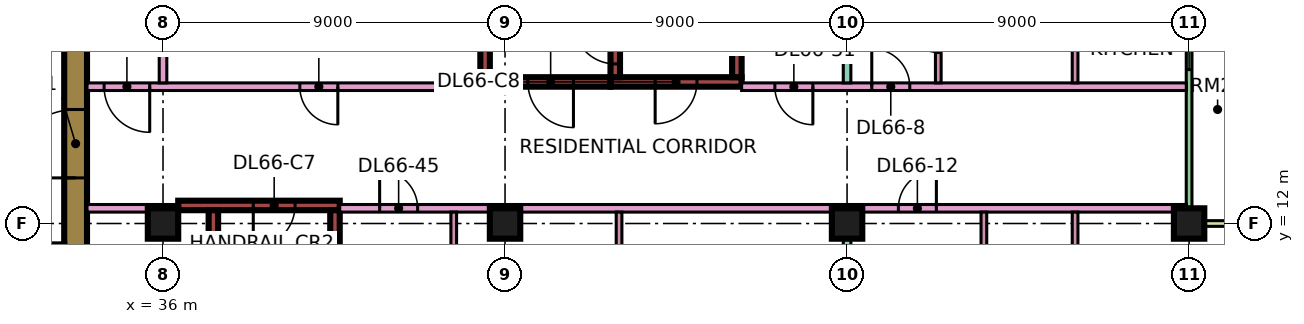
"""IFC4 building model, lengths in metres.
Left out: names, types, materials, properties, quantities, classifications, styles, units other than length and angle.
Written with IfcOpenShell. Run it as: python <this file> out.ifc"""

import sys

from ifc_helpers import new_model, si_unit, direction, frame, frame_2d, origin, origin_2d, place, context, subcontext, project, spatial, rectangle, extrude, element, fill, save


model = new_model("IFC4")
c1 = context("Model", 3, precision=1e-05, world=origin(), true_north=direction((0.0, 1.0)))
c2 = subcontext(c1, "Body", "Model", "MODEL_VIEW")
j1 = project(units=[si_unit("LENGTHUNIT", "METRE"), si_unit("PLANEANGLEUNIT", "RADIAN")], contexts=[c1])
p1 = place(None, origin())
s1 = spatial("IfcSite", under=j1, at=p1, CompositionType="ELEMENT")
p2 = place(p1, origin())
s2 = spatial("IfcBuilding", under=s1, at=p2, CompositionType="ELEMENT")
p3 = place(p2, frame((0.0, 0.0, 284.65)))
s3 = spatial("IfcBuildingStorey", under=s2, at=p3, CompositionType="ELEMENT", Elevation=284.65)
for number, where, z_axis, x_axis in (
    (1, (36.0, 12.0, 0.0), (0.0, 0.0, 1.0), (1.0, 0.0, 0.0)),
    (2, (45.0, 12.0, 0.0), (0.0, 0.0, 1.0), (1.0, 0.0, 0.0)),
    (3, (54.0, 12.0, 0.0), (0.0, 0.0, 1.0), (1.0, 0.0, 0.0)),
    (4, (63.0, 12.0, 0.0), (0.0, 0.0, 1.0), (1.0, 0.0, 0.0)),
):
    element("IfcColumn", number, at=place(p3, frame(where, z_axis=z_axis, x_axis=x_axis)), inside=s3, PredefinedType="COLUMN", context=c2, shape_type="SweptSolid", body=[
        extrude(rectangle(XDim=0.8, YDim=0.8, at=origin_2d()), origin(), (0.0, 0.0, 1.0), 3.75),
    ])
p4 = place(p3, frame((33.7, 7.6, 0.0), z_axis=(0.0, 0.0, 1.0), x_axis=(0.0, 1.0, 0.0)))
e5 = element("IfcWall", 5, at=p4, inside=s3, PredefinedType="SHEAR", context=c2, shape_type="SweptSolid", body=[
    extrude(rectangle(XDim=11.8, YDim=0.6, at=frame_2d((5.9, 0.0))), origin(), (0.0, 0.0, 1.0), 3.75),
])
p5 = place(p4, frame((5.6, 0.0, 0.0)))
e6 = element("IfcOpeningElement", 6, at=p5, cuts=e5, PredefinedType="OPENING", context=c2, shape_type="SweptSolid", body=[
    extrude(rectangle(XDim=1.8, YDim=2.4, at=frame_2d((0.9, 1.2))), frame((0.0, 0.31, 0.0), z_axis=(0.0, -1.0, 0.0), x_axis=(1.0, 0.0, 0.0)), (0.0, 0.0, 1.0), 0.62),
])
p6 = place(p3, frame((36.4, 12.475, 0.0), z_axis=(0.0, 0.0, 1.0), x_axis=(1.0, 0.0, 0.0)))
e7 = element("IfcWall", 7, at=p6, inside=s3, PredefinedType="SHEAR", context=c2, shape_type="SweptSolid", body=[
    extrude(rectangle(XDim=4.25, YDim=0.25, at=frame_2d((2.125, 0.0))), origin(), (0.0, 0.0, 1.0), 3.75),
])
p7 = place(p6, frame((1.975, 0.0, 0.0)))
e8 = element("IfcOpeningElement", 8, at=p7, cuts=e7, PredefinedType="OPENING", context=c2, shape_type="SweptSolid", body=[
    extrude(rectangle(XDim=1.1, YDim=2.2, at=frame_2d((0.55, 1.1))), frame((0.0, 0.135, 0.0), z_axis=(0.0, -1.0, 0.0), x_axis=(1.0, 0.0, 0.0)), (0.0, 0.0, 1.0), 0.27),
])
for number, where, z_axis, x_axis in (
    (9, (37.325, 5.85, 0.0), (0.0, 0.0, 1.0), (0.0, 1.0, 0.0)),
    (10, (40.525, 5.85, 0.0), (0.0, 0.0, 1.0), (0.0, 1.0, 0.0)),
):
    element("IfcWall", number, at=place(p3, frame(where, z_axis=z_axis, x_axis=x_axis)), inside=s3, PredefinedType="SHEAR", context=c2, shape_type="SweptSolid", body=[
        extrude(rectangle(XDim=6.5, YDim=0.25, at=frame_2d((3.25, 0.0))), origin(), (0.0, 0.0, 1.0), 3.75),
    ])
p8 = place(p3, frame((47.775, 15.725, 0.0), z_axis=(0.0, 0.0, 1.0), x_axis=(1.0, 0.0, 0.0)))
e11 = element("IfcWall", 11, at=p8, inside=s3, PredefinedType="SHEAR", context=c2, shape_type="SweptSolid", body=[
    extrude(rectangle(XDim=3.45, YDim=0.25, at=frame_2d((1.725, 0.0))), origin(), (0.0, 0.0, 1.0), 3.75),
])
p9 = place(p8, frame((1.175, 0.0, 0.0)))
e12 = element("IfcOpeningElement", 12, at=p9, cuts=e11, PredefinedType="OPENING", context=c2, shape_type="SweptSolid", body=[
    extrude(rectangle(XDim=1.1, YDim=2.2, at=frame_2d((0.55, 1.1))), frame((0.0, 0.135, 0.0), z_axis=(0.0, -1.0, 0.0), x_axis=(1.0, 0.0, 0.0)), (0.0, 0.0, 1.0), 0.27),
])
p10 = place(p3, frame((47.9, 15.85, 0.0), z_axis=(0.0, 0.0, 1.0), x_axis=(0.0, 1.0, 0.0)))
e13 = element("IfcWall", 13, at=p10, inside=s3, PredefinedType="SHEAR", context=c2, shape_type="SweptSolid", body=[
    extrude(rectangle(XDim=6.5, YDim=0.25, at=frame_2d((3.25, 0.0))), origin(), (0.0, 0.0, 1.0), 3.75),
])
p11 = place(p10, frame((0.35, 0.0, 0.0)))
e14 = element("IfcOpeningElement", 14, at=p11, cuts=e13, PredefinedType="OPENING", context=c2, shape_type="SweptSolid", body=[
    extrude(rectangle(XDim=1.1, YDim=2.2, at=frame_2d((0.55, 1.1))), frame((0.0, 0.135, 0.0), z_axis=(0.0, -1.0, 0.0), x_axis=(1.0, 0.0, 0.0)), (0.0, 0.0, 1.0), 0.27),
])
p12 = place(p3, frame((51.1, 15.85, 0.0), z_axis=(0.0, 0.0, 1.0), x_axis=(0.0, 1.0, 0.0)))
e15 = element("IfcWall", 15, at=p12, inside=s3, PredefinedType="SHEAR", context=c2, shape_type="SweptSolid", body=[
    extrude(rectangle(XDim=6.5, YDim=0.25, at=frame_2d((3.25, 0.0))), origin(), (0.0, 0.0, 1.0), 3.75),
])
p13 = place(p3, frame((44.35, 15.725, 0.0), z_axis=(0.0, 0.0, 1.0), x_axis=(1.0, 0.0, 0.0)))
e16 = element("IfcWall", 16, at=p13, inside=s3, PredefinedType="SHEAR", context=c2, shape_type="SweptSolid", body=[
    extrude(rectangle(XDim=3.425, YDim=0.25, at=frame_2d((1.712, 0.0))), origin(), (0.0, 0.0, 1.0), 3.75),
])
p14 = place(p13, frame((1.25, 0.0, 0.0)))
e17 = element("IfcOpeningElement", 17, at=p14, cuts=e16, PredefinedType="OPENING", context=c2, shape_type="SweptSolid", body=[
    extrude(rectangle(XDim=1.2, YDim=2.2, at=frame_2d((0.6, 1.1))), frame((0.0, 0.135, 0.0), z_axis=(0.0, -1.0, 0.0), x_axis=(1.0, 0.0, 0.0)), (0.0, 0.0, 1.0), 0.27),
])
p15 = place(p3, frame((44.475, 15.85, 0.0), z_axis=(0.0, 0.0, 1.0), x_axis=(0.0, 1.0, 0.0)))
e18 = element("IfcWall", 18, at=p15, inside=s3, PredefinedType="SHEAR", context=c2, shape_type="SweptSolid", body=[
    extrude(rectangle(XDim=6.5, YDim=0.25, at=frame_2d((3.25, 0.0))), origin(), (0.0, 0.0, 1.0), 3.75),
])
p16 = place(p15, frame((1.75, 0.0, 0.0)))
e19 = element("IfcOpeningElement", 19, at=p16, cuts=e18, PredefinedType="OPENING", context=c2, shape_type="SweptSolid", body=[
    extrude(rectangle(XDim=1.1, YDim=2.2, at=frame_2d((0.55, 1.1))), frame((0.0, 0.135, 0.0), z_axis=(0.0, -1.0, 0.0), x_axis=(1.0, 0.0, 0.0)), (0.0, 0.0, 1.0), 0.27),
])
p17 = place(p15, frame((4.3, 0.0, 0.0)))
e20 = element("IfcOpeningElement", 20, at=p17, cuts=e18, PredefinedType="OPENING", context=c2, shape_type="SweptSolid", body=[
    extrude(rectangle(XDim=1.1, YDim=2.2, at=frame_2d((0.55, 1.1))), frame((0.0, 0.135, 0.0), z_axis=(0.0, -1.0, 0.0), x_axis=(1.0, 0.0, 0.0)), (0.0, 0.0, 1.0), 0.27),
])
p18 = place(p3, frame((63.0, 12.075, 0.0), z_axis=(0.0, 0.0, 1.0), x_axis=(0.0, 1.0, 0.0)))
e21 = element("IfcWall", 21, at=p18, inside=s3, PredefinedType="SOLIDWALL", context=c2, shape_type="SweptSolid", body=[
    extrude(rectangle(XDim=10.35, YDim=0.15, at=frame_2d((5.175, 0.0))), origin(), (0.0, 0.0, 1.0), 3.35),
])
p19 = place(p18, frame((3.975, 0.0, 0.45)))
e22 = element("IfcOpeningElement", 22, at=p19, cuts=e21, PredefinedType="OPENING", context=c2, shape_type="SweptSolid", body=[
    extrude(rectangle(XDim=1.8, YDim=2.4, at=frame_2d((0.9, 1.2))), frame((0.0, 0.085, 0.0), z_axis=(0.0, -1.0, 0.0), x_axis=(1.0, 0.0, 0.0)), (0.0, 0.0, 1.0), 0.17),
])
p20 = place(p18, frame((7.988, 0.0, 0.45)))
e23 = element("IfcOpeningElement", 23, at=p20, cuts=e21, PredefinedType="OPENING", context=c2, shape_type="SweptSolid", body=[
    extrude(rectangle(XDim=1.8, YDim=2.4, at=frame_2d((0.9, 1.2))), frame((0.0, 0.085, 0.0), z_axis=(0.0, -1.0, 0.0), x_axis=(1.0, 0.0, 0.0)), (0.0, 0.0, 1.0), 0.17),
])
p21 = place(p3, frame((64.5, 12.0, 0.0), z_axis=(0.0, 0.0, 1.0), x_axis=(-1.0, 0.0, 0.0)))
e24 = element("IfcWall", 24, at=p21, inside=s3, PredefinedType="SOLIDWALL", context=c2, shape_type="SweptSolid", body=[
    extrude(rectangle(XDim=1.5, YDim=0.15, at=frame_2d((0.75, 0.0))), origin(), (0.0, 0.0, 1.0), 3.35),
])
p22 = place(p3, frame((34.0, 12.4, 0.0), z_axis=(0.0, 0.0, 1.0), x_axis=(1.0, 0.0, 0.0)))
e25 = element("IfcWall", 25, at=p22, inside=s3, PredefinedType="PARTITIONING", context=c2, shape_type="SweptSolid", body=[
    extrude(rectangle(XDim=2.401, YDim=0.2, at=frame_2d((1.2, 0.0))), origin(), (0.0, 0.0, 1.0), 3.35),
])
p23 = place(p3, frame((34.0, 15.6, 0.0), z_axis=(0.0, 0.0, 1.0), x_axis=(1.0, 0.0, 0.0)))
e26 = element("IfcWall", 26, at=p23, inside=s3, PredefinedType="PARTITIONING", context=c2, shape_type="SweptSolid", body=[
    extrude(rectangle(XDim=10.35, YDim=0.2, at=frame_2d((5.175, 0.0))), origin(), (0.0, 0.0, 1.0), 3.35),
])
p24 = place(p23, frame((5.6, 0.0, 0.0)))
e27 = element("IfcOpeningElement", 27, at=p24, cuts=e26, PredefinedType="OPENING", context=c2, shape_type="SweptSolid", body=[
    extrude(rectangle(XDim=1.0, YDim=2.1, at=frame_2d((0.5, 1.05))), frame((0.0, 0.11, 0.0), z_axis=(0.0, -1.0, 0.0), x_axis=(1.0, 0.0, 0.0)), (0.0, 0.0, 1.0), 0.22),
])
p25 = place(p23, frame((0.45, 0.0, 0.0)))
e28 = element("IfcOpeningElement", 28, at=p25, cuts=e26, PredefinedType="OPENING", context=c2, shape_type="SweptSolid", body=[
    extrude(rectangle(XDim=1.2, YDim=2.1, at=frame_2d((0.6, 1.05))), frame((0.0, 0.11, 0.0), z_axis=(0.0, -1.0, 0.0), x_axis=(1.0, 0.0, 0.0)), (0.0, 0.0, 1.0), 0.22),
])
p26 = place(p3, frame((36.0, 15.7, 0.0), z_axis=(0.0, 0.0, 1.0), x_axis=(0.0, 1.0, 0.0)))
e29 = element("IfcWall", 29, at=p26, inside=s3, PredefinedType="PARTITIONING", context=c2, shape_type="SweptSolid", body=[
    extrude(rectangle(XDim=8.3, YDim=0.2, at=frame_2d((4.15, 0.0))), origin(), (0.0, 0.0, 1.0), 3.35),
])
p27 = place(p3, frame((40.65, 12.4, 0.0), z_axis=(0.0, 0.0, 1.0), x_axis=(1.0, 0.0, 0.0)))
e30 = element("IfcWall", 30, at=p27, inside=s3, PredefinedType="PARTITIONING", context=c2, shape_type="SweptSolid", body=[
    extrude(rectangle(XDim=22.276, YDim=0.2, at=frame_2d((11.138, 0.0))), origin(), (0.0, 0.0, 1.0), 3.35),
])
p28 = place(p27, frame((14.7, 0.0, 0.0)))
e31 = element("IfcOpeningElement", 31, at=p28, cuts=e30, PredefinedType="OPENING", context=c2, shape_type="SweptSolid", body=[
    extrude(rectangle(XDim=1.0, YDim=2.1, at=frame_2d((0.5, 1.05))), frame((0.0, 0.11, 0.0), z_axis=(0.0, -1.0, 0.0), x_axis=(1.0, 0.0, 0.0)), (0.0, 0.0, 1.0), 0.22),
])
p29 = place(p27, frame((1.05, 0.0, 0.0)))
e32 = element("IfcOpeningElement", 32, at=p29, cuts=e30, PredefinedType="OPENING", context=c2, shape_type="SweptSolid", body=[
    extrude(rectangle(XDim=1.0, YDim=2.1, at=frame_2d((0.5, 1.05))), frame((0.0, 0.11, 0.0), z_axis=(0.0, -1.0, 0.0), x_axis=(1.0, 0.0, 0.0)), (0.0, 0.0, 1.0), 0.22),
])
p30 = place(p3, frame((43.65, 5.975, 0.0), z_axis=(0.0, 0.0, 1.0), x_axis=(0.0, 1.0, 0.0)))
e33 = element("IfcWall", 33, at=p30, inside=s3, PredefinedType="PARTITIONING", context=c2, shape_type="SweptSolid", body=[
    extrude(rectangle(XDim=6.325, YDim=0.15, at=frame_2d((3.163, 0.0))), origin(), (0.0, 0.0, 1.0), 3.35),
])
p31 = place(p30, frame((4.275, 0.0, 0.0)))
e34 = element("IfcOpeningElement", 34, at=p31, cuts=e33, PredefinedType="OPENING", context=c2, shape_type="SweptSolid", body=[
    extrude(rectangle(XDim=0.9, YDim=2.1, at=frame_2d((0.45, 1.05))), frame((0.0, 0.085, 0.0), z_axis=(0.0, -1.0, 0.0), x_axis=(1.0, 0.0, 0.0)), (0.0, 0.0, 1.0), 0.17),
])
p32 = place(p3, frame((48.0, 5.975, 0.0), z_axis=(0.0, 0.0, 1.0), x_axis=(0.0, 1.0, 0.0)))
e35 = element("IfcWall", 35, at=p32, inside=s3, PredefinedType="PARTITIONING", context=c2, shape_type="SweptSolid", body=[
    extrude(rectangle(XDim=6.325, YDim=0.15, at=frame_2d((3.163, 0.0))), origin(), (0.0, 0.0, 1.0), 3.35),
])
p33 = place(p3, frame((51.225, 15.6, 0.0), z_axis=(0.0, 0.0, 1.0), x_axis=(1.0, 0.0, 0.0)))
e36 = element("IfcWall", 36, at=p33, inside=s3, PredefinedType="PARTITIONING", context=c2, shape_type="SweptSolid", body=[
    extrude(rectangle(XDim=11.701, YDim=0.2, at=frame_2d((5.851, 0.0))), origin(), (0.0, 0.0, 1.0), 3.35),
])
p34 = place(p33, frame((3.425, 0.0, 0.0)))
e37 = element("IfcOpeningElement", 37, at=p34, cuts=e36, PredefinedType="OPENING", context=c2, shape_type="SweptSolid", body=[
    extrude(rectangle(XDim=1.0, YDim=2.1, at=frame_2d((0.5, 1.05))), frame((0.0, 0.11, 0.0), z_axis=(0.0, -1.0, 0.0), x_axis=(1.0, 0.0, 0.0)), (0.0, 0.0, 1.0), 0.22),
])
p35 = place(p33, frame((0.875, 0.0, 0.0)))
e38 = element("IfcOpeningElement", 38, at=p35, cuts=e36, PredefinedType="OPENING", context=c2, shape_type="SweptSolid", body=[
    extrude(rectangle(XDim=1.0, YDim=2.1, at=frame_2d((0.5, 1.05))), frame((0.0, 0.11, 0.0), z_axis=(0.0, -1.0, 0.0), x_axis=(1.0, 0.0, 0.0)), (0.0, 0.0, 1.0), 0.22),
])
p36 = place(p3, frame((54.0, 5.825, 0.0), z_axis=(0.0, 0.0, 1.0), x_axis=(0.0, 1.0, 0.0)))
e39 = element("IfcWall", 39, at=p36, inside=s3, PredefinedType="PARTITIONING", context=c2, shape_type="SweptSolid", body=[
    extrude(rectangle(XDim=6.475, YDim=0.2, at=frame_2d((3.238, 0.0))), origin(), (0.0, 0.0, 1.0), 3.35),
])
p37 = place(p3, frame((54.0, 15.7, 0.0), z_axis=(0.0, 0.0, 1.0), x_axis=(0.0, 1.0, 0.0)))
e40 = element("IfcWall", 40, at=p37, inside=s3, PredefinedType="PARTITIONING", context=c2, shape_type="SweptSolid", body=[
    extrude(rectangle(XDim=8.3, YDim=0.2, at=frame_2d((4.15, 0.0))), origin(), (0.0, 0.0, 1.0), 3.35),
])
p38 = place(p3, frame((56.4, 15.7, 0.0), z_axis=(0.0, 0.0, 1.0), x_axis=(0.0, 1.0, 0.0)))
e41 = element("IfcWall", 41, at=p38, inside=s3, PredefinedType="PARTITIONING", context=c2, shape_type="SweptSolid", body=[
    extrude(rectangle(XDim=2.525, YDim=0.15, at=frame_2d((1.263, 0.0))), origin(), (0.0, 0.0, 1.0), 3.35),
])
p39 = place(p38, frame((0.8, 0.0, 0.0)))
e42 = element("IfcOpeningElement", 42, at=p39, cuts=e41, PredefinedType="OPENING", context=c2, shape_type="SweptSolid", body=[
    extrude(rectangle(XDim=0.8, YDim=2.1, at=frame_2d((0.4, 1.05))), frame((0.0, 0.085, 0.0), z_axis=(0.0, -1.0, 0.0), x_axis=(1.0, 0.0, 0.0)), (0.0, 0.0, 1.0), 0.17),
])
p40 = place(p3, frame((57.6, 6.925, 0.0), z_axis=(0.0, 0.0, 1.0), x_axis=(0.0, 1.0, 0.0)))
e43 = element("IfcWall", 43, at=p40, inside=s3, PredefinedType="PARTITIONING", context=c2, shape_type="SweptSolid", body=[
    extrude(rectangle(XDim=5.375, YDim=0.15, at=frame_2d((2.688, 0.0))), origin(), (0.0, 0.0, 1.0), 3.35),
])
p41 = place(p3, frame((60.0, 7.075, 0.0), z_axis=(0.0, 0.0, 1.0), x_axis=(0.0, 1.0, 0.0)))
e44 = element("IfcWall", 44, at=p41, inside=s3, PredefinedType="PARTITIONING", context=c2, shape_type="SweptSolid", body=[
    extrude(rectangle(XDim=5.225, YDim=0.15, at=frame_2d((2.613, 0.0))), origin(), (0.0, 0.0, 1.0), 3.35),
])
p42 = place(p3, frame((60.0, 15.7, 0.0), z_axis=(0.0, 0.0, 1.0), x_axis=(0.0, 1.0, 0.0)))
e45 = element("IfcWall", 45, at=p42, inside=s3, PredefinedType="PARTITIONING", context=c2, shape_type="SweptSolid", body=[
    extrude(rectangle(XDim=2.525, YDim=0.15, at=frame_2d((1.263, 0.0))), origin(), (0.0, 0.0, 1.0), 3.35),
])
p43 = place(p19, origin())
e46 = element("IfcWindow", 46, at=p43, inside=s3, PartitioningType="SINGLE_PANEL", PredefinedType="WINDOW", context=c2, shape_type="SweptSolid", body=[
    extrude(rectangle(XDim=1.8, YDim=2.4, at=frame_2d((0.9, 1.2))), frame((0.0, 0.03, 0.0), z_axis=(0.0, -1.0, 0.0), x_axis=(1.0, 0.0, 0.0)), (0.0, 0.0, 1.0), 0.06),
])
fill(e22, e46)
p44 = place(p5, origin())
e47 = element("IfcDoor", 47, at=p44, inside=s3, OperationType="DOUBLE_DOOR_SINGLE_SWING", PredefinedType="DOOR", context=c2, shape_type="SweptSolid", body=[
    extrude(rectangle(XDim=1.8, YDim=2.4, at=frame_2d((0.9, 1.2))), frame((0.0, 0.025, 0.0), z_axis=(0.0, -1.0, 0.0), x_axis=(1.0, 0.0, 0.0)), (0.0, 0.0, 1.0), 0.05),
])
fill(e6, e47)
p45 = place(p7, frame((1.1, 0.0, 0.0), z_axis=(0.0, 0.0, 1.0), x_axis=(-1.0, 0.0, 0.0)))
e48 = element("IfcDoor", 48, at=p45, inside=s3, OperationType="SINGLE_SWING_LEFT", PredefinedType="DOOR", context=c2, shape_type="SweptSolid", body=[
    extrude(rectangle(XDim=1.1, YDim=2.2, at=frame_2d((0.55, 1.1))), frame((0.0, 0.025, 0.0), z_axis=(0.0, -1.0, 0.0), x_axis=(1.0, 0.0, 0.0)), (0.0, 0.0, 1.0), 0.05),
])
fill(e8, e48)
p46 = place(p9, frame((1.1, 0.0, 0.0), z_axis=(0.0, 0.0, 1.0), x_axis=(-1.0, 0.0, 0.0)))
e49 = element("IfcDoor", 49, at=p46, inside=s3, OperationType="SINGLE_SWING_LEFT", PredefinedType="DOOR", context=c2, shape_type="SweptSolid", body=[
    extrude(rectangle(XDim=1.1, YDim=2.2, at=frame_2d((0.55, 1.1))), frame((0.0, 0.025, 0.0), z_axis=(0.0, -1.0, 0.0), x_axis=(1.0, 0.0, 0.0)), (0.0, 0.0, 1.0), 0.05),
])
fill(e12, e49)
p47 = place(p14, origin())
e50 = element("IfcDoor", 50, at=p47, inside=s3, OperationType="SINGLE_SWING_RIGHT", PredefinedType="DOOR", context=c2, shape_type="SweptSolid", body=[
    extrude(rectangle(XDim=1.2, YDim=2.2, at=frame_2d((0.6, 1.1))), frame((0.0, 0.025, 0.0), z_axis=(0.0, -1.0, 0.0), x_axis=(1.0, 0.0, 0.0)), (0.0, 0.0, 1.0), 0.05),
])
fill(e17, e50)
p48 = place(p11, frame((1.1, 0.0, 0.0), z_axis=(0.0, 0.0, 1.0), x_axis=(-1.0, 0.0, 0.0)))
e51 = element("IfcDoor", 51, at=p48, inside=s3, OperationType="SINGLE_SWING_RIGHT", PredefinedType="DOOR", context=c2, shape_type="SweptSolid", body=[
    extrude(rectangle(XDim=1.1, YDim=2.2, at=frame_2d((0.55, 1.1))), frame((0.0, 0.025, 0.0), z_axis=(0.0, -1.0, 0.0), x_axis=(1.0, 0.0, 0.0)), (0.0, 0.0, 1.0), 0.05),
])
fill(e14, e51)
p49 = place(p24, origin())
e52 = element("IfcDoor", 52, at=p49, inside=s3, OperationType="SINGLE_SWING_RIGHT", PredefinedType="DOOR", context=c2, shape_type="SweptSolid", body=[
    extrude(rectangle(XDim=1.0, YDim=2.1, at=frame_2d((0.5, 1.05))), frame((0.0, 0.025, 0.0), z_axis=(0.0, -1.0, 0.0), x_axis=(1.0, 0.0, 0.0)), (0.0, 0.0, 1.0), 0.05),
])
fill(e27, e52)
p50 = place(p39, frame((0.8, 0.0, 0.0), z_axis=(0.0, 0.0, 1.0), x_axis=(-1.0, 0.0, 0.0)))
e53 = element("IfcDoor", 53, at=p50, inside=s3, OperationType="SINGLE_SWING_RIGHT", PredefinedType="DOOR", context=c2, shape_type="SweptSolid", body=[
    extrude(rectangle(XDim=0.8, YDim=2.1, at=frame_2d((0.4, 1.05))), frame((0.0, 0.025, 0.0), z_axis=(0.0, -1.0, 0.0), x_axis=(1.0, 0.0, 0.0)), (0.0, 0.0, 1.0), 0.05),
])
fill(e42, e53)
p51 = place(p34, origin())
e54 = element("IfcDoor", 54, at=p51, inside=s3, OperationType="SINGLE_SWING_LEFT", PredefinedType="DOOR", context=c2, shape_type="SweptSolid", body=[
    extrude(rectangle(XDim=1.0, YDim=2.1, at=frame_2d((0.5, 1.05))), frame((0.0, 0.025, 0.0), z_axis=(0.0, -1.0, 0.0), x_axis=(1.0, 0.0, 0.0)), (0.0, 0.0, 1.0), 0.05),
])
fill(e37, e54)
p52 = place(p28, frame((1.0, 0.0, 0.0), z_axis=(0.0, 0.0, 1.0), x_axis=(-1.0, 0.0, 0.0)))
e55 = element("IfcDoor", 55, at=p52, inside=s3, OperationType="SINGLE_SWING_RIGHT", PredefinedType="DOOR", context=c2, shape_type="SweptSolid", body=[
    extrude(rectangle(XDim=1.0, YDim=2.1, at=frame_2d((0.5, 1.05))), frame((0.0, 0.025, 0.0), z_axis=(0.0, -1.0, 0.0), x_axis=(1.0, 0.0, 0.0)), (0.0, 0.0, 1.0), 0.05),
])
fill(e31, e55)
p53 = place(p25, origin())
e56 = element("IfcDoor", 56, at=p53, inside=s3, OperationType="SINGLE_SWING_RIGHT", PredefinedType="DOOR", context=c2, shape_type="SweptSolid", body=[
    extrude(rectangle(XDim=1.2, YDim=2.1, at=frame_2d((0.6, 1.05))), frame((0.0, 0.025, 0.0), z_axis=(0.0, -1.0, 0.0), x_axis=(1.0, 0.0, 0.0)), (0.0, 0.0, 1.0), 0.05),
])
fill(e28, e56)
p54 = place(p35, origin())
e57 = element("IfcDoor", 57, at=p54, inside=s3, OperationType="SINGLE_SWING_RIGHT", PredefinedType="DOOR", context=c2, shape_type="SweptSolid", body=[
    extrude(rectangle(XDim=1.0, YDim=2.1, at=frame_2d((0.5, 1.05))), frame((0.0, 0.025, 0.0), z_axis=(0.0, -1.0, 0.0), x_axis=(1.0, 0.0, 0.0)), (0.0, 0.0, 1.0), 0.05),
])
fill(e38, e57)
p55 = place(p29, origin())
e58 = element("IfcDoor", 58, at=p55, inside=s3, OperationType="SINGLE_SWING_LEFT", PredefinedType="DOOR", context=c2, shape_type="SweptSolid", body=[
    extrude(rectangle(XDim=1.0, YDim=2.1, at=frame_2d((0.5, 1.05))), frame((0.0, 0.025, 0.0), z_axis=(0.0, -1.0, 0.0), x_axis=(1.0, 0.0, 0.0)), (0.0, 0.0, 1.0), 0.05),
])
fill(e32, e58)
save(model, sys.argv[1])
